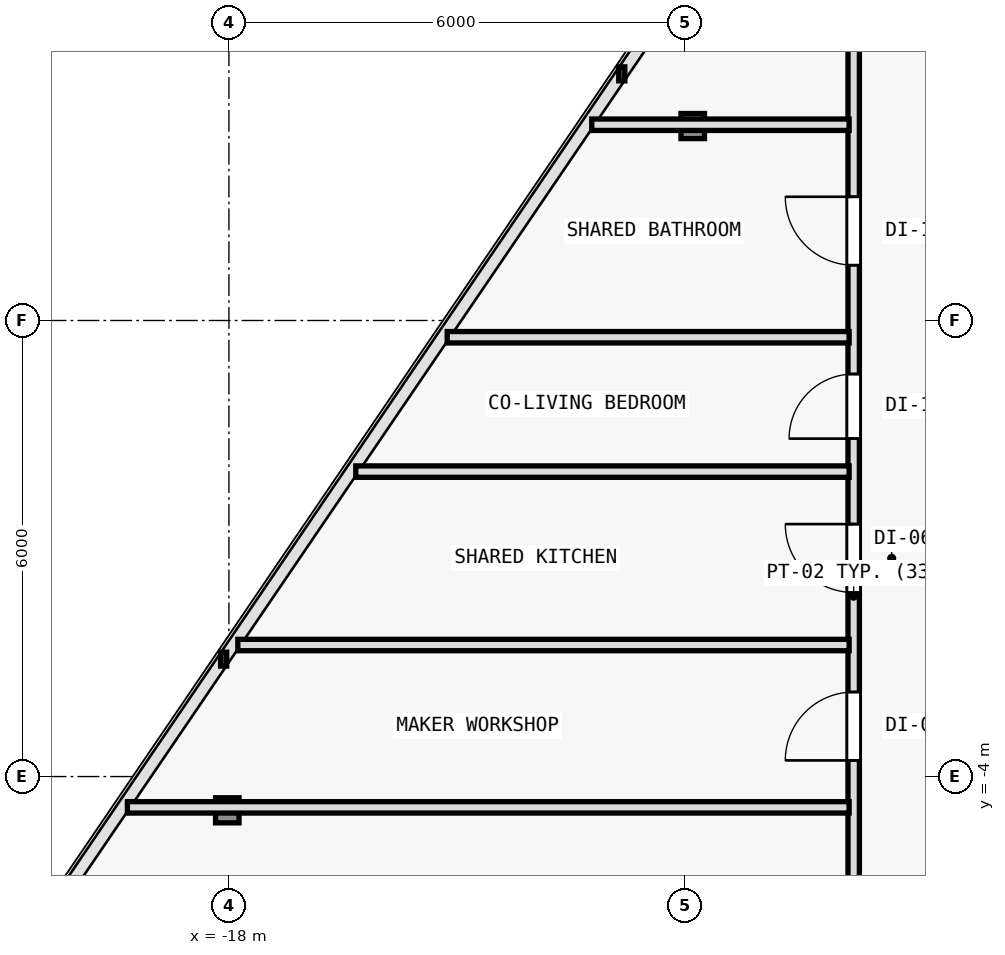
"""IFC4 building model, lengths in metres.
Left out: names, types, materials, properties, quantities, classifications, styles, units other than length and angle.
Written with IfcOpenShell. Run it as: python <this file> out.ifc"""

import sys

from ifc_helpers import new_model, si_unit, direction, frame, frame_2d, origin, origin_2d, place, context, subcontext, project, spatial, rectangle, i_section, extrude, element, fill, save


model = new_model("IFC4")
c1 = context("Model", 3, precision=1e-05, world=origin(), true_north=direction((0.0, 1.0)))
c2 = subcontext(c1, "Body", "Model", "MODEL_VIEW")
j1 = project(units=[si_unit("LENGTHUNIT", "METRE"), si_unit("PLANEANGLEUNIT", "RADIAN")], contexts=[c1])
p1 = place(None, origin())
s1 = spatial("IfcSite", under=j1, at=p1, CompositionType="ELEMENT")
p2 = place(p1, origin())
s2 = spatial("IfcBuilding", under=s1, at=p2, CompositionType="ELEMENT")
p3 = place(p2, frame((0.0, 0.0, 286.8)))
s3 = spatial("IfcBuildingStorey", under=s2, at=p3, CompositionType="ELEMENT", Elevation=286.8)
p4 = place(p3, frame((-11.897, 4.558, 0.005), z_axis=(0.01700241672, 0.009521353363, 0.999810112799), x_axis=(-0.488603368932, 0.87250601595, 0.0)))
e1 = element("IfcColumn", 1, at=p4, inside=s3, PredefinedType="COLUMN", context=c2, shape_type="SweptSolid", body=[
    extrude(i_section(OverallWidth=0.309, OverallDepth=0.33, WebThickness=0.011, FlangeThickness=0.019, FilletRadius=0.027, at=origin_2d()), origin(), (0.0, 0.0, 1.0), 3.59),
])
p5 = place(p3, frame((-18.021, -4.444, 0.005), z_axis=(0.025222449659, 0.021619242565, 0.999448065876), x_axis=(-0.650791373456, 0.759256602365, 0.0)))
e2 = element("IfcColumn", 2, at=p5, inside=s3, PredefinedType="COLUMN", context=c2, shape_type="SweptSolid", body=[
    extrude(i_section(OverallWidth=0.309, OverallDepth=0.33, WebThickness=0.011, FlangeThickness=0.019, FilletRadius=0.027, at=origin_2d()), origin(), (0.0, 0.0, 1.0), 3.591),
])
p6 = place(p3, frame((-9.78, -11.48, 0.0), z_axis=(0.0, 0.0, 1.0), x_axis=(0.0, 1.0, 0.0)))
e3 = element("IfcWall", 3, at=p6, inside=s3, PredefinedType="PARTITIONING", context=c2, shape_type="SweptSolid", body=[
    extrude(rectangle(XDim=19.706, YDim=0.15, at=frame_2d((9.853, 0.0))), origin(), (0.0, 0.0, 1.0), 2.875),
])
p7 = place(p6, frame((9.901, 0.0, 0.0)))
e4 = element("IfcOpeningElement", 4, at=p7, cuts=e3, PredefinedType="OPENING", context=c2, shape_type="SweptSolid", body=[
    extrude(rectangle(XDim=0.9, YDim=2.1, at=frame_2d((0.45, 1.05))), frame((0.0, 0.085, 0.0), z_axis=(0.0, -1.0, 0.0), x_axis=(1.0, 0.0, 0.0)), (0.0, 0.0, 1.0), 0.17),
])
p8 = place(p6, frame((7.692, 0.0, 0.0)))
e5 = element("IfcOpeningElement", 5, at=p8, cuts=e3, PredefinedType="OPENING", context=c2, shape_type="SweptSolid", body=[
    extrude(rectangle(XDim=0.9, YDim=2.1, at=frame_2d((0.45, 1.05))), frame((0.0, 0.085, 0.0), z_axis=(0.0, -1.0, 0.0), x_axis=(1.0, 0.0, 0.0)), (0.0, 0.0, 1.0), 0.17),
])
p9 = place(p6, frame((14.208, 0.0, 0.0)))
e6 = element("IfcOpeningElement", 6, at=p9, cuts=e3, PredefinedType="OPENING", context=c2, shape_type="SweptSolid", body=[
    extrude(rectangle(XDim=0.9, YDim=2.1, at=frame_2d((0.45, 1.05))), frame((0.0, 0.085, 0.0), z_axis=(0.0, -1.0, 0.0), x_axis=(1.0, 0.0, 0.0)), (0.0, 0.0, 1.0), 0.17),
])
p10 = place(p6, frame((11.926, 0.0, 0.0)))
e7 = element("IfcOpeningElement", 7, at=p10, cuts=e3, PredefinedType="OPENING", context=c2, shape_type="SweptSolid", body=[
    extrude(rectangle(XDim=0.85, YDim=2.1, at=frame_2d((0.425, 1.05))), frame((0.0, 0.085, 0.0), z_axis=(0.0, -1.0, 0.0), x_axis=(1.0, 0.0, 0.0)), (0.0, 0.0, 1.0), 0.17),
])
p11 = place(p3, frame((-9.84, 4.575, 0.0), z_axis=(0.0, 0.0, 1.0), x_axis=(-1.0, 0.0, 0.0)))
e8 = element("IfcWall", 8, at=p11, inside=s3, PredefinedType="PARTITIONING", context=c2, shape_type="SweptSolid", body=[
    extrude(rectangle(XDim=3.386, YDim=0.15, at=frame_2d((1.693, 0.0))), origin(), (0.0, 0.0, 1.0), 3.015),
])
p12 = place(p3, frame((-9.84, -4.405, 0.0), z_axis=(0.0, 0.0, 1.0), x_axis=(-1.0, 0.0, 0.0)))
e9 = element("IfcWall", 9, at=p12, inside=s3, PredefinedType="PARTITIONING", context=c2, shape_type="SweptSolid", body=[
    extrude(rectangle(XDim=9.496, YDim=0.15, at=frame_2d((4.748, 0.0))), origin(), (0.0, 0.0, 1.0), 2.875),
])
p13 = place(p3, frame((-9.84, 0.012, 0.0), z_axis=(0.0, 0.0, 1.0), x_axis=(-1.0, 0.0, 0.0)))
e10 = element("IfcWall", 10, at=p13, inside=s3, PredefinedType="PARTITIONING", context=c2, shape_type="SweptSolid", body=[
    extrude(rectangle(XDim=6.491, YDim=0.15, at=frame_2d((3.245, 0.0))), origin(), (0.0, 0.0, 1.0), 2.965),
])
p14 = place(p3, frame((-9.84, -2.27, 0.0), z_axis=(0.0, 0.0, 1.0), x_axis=(-1.0, 0.0, 0.0)))
e11 = element("IfcWall", 11, at=p14, inside=s3, PredefinedType="PARTITIONING", context=c2, shape_type="SweptSolid", body=[
    extrude(rectangle(XDim=8.043, YDim=0.15, at=frame_2d((4.021, 0.0))), origin(), (0.0, 0.0, 1.0), 2.965),
])
p15 = place(p3, frame((-9.84, 1.78, 0.0), z_axis=(0.0, 0.0, 1.0), x_axis=(-1.0, 0.0, 0.0)))
e12 = element("IfcWall", 12, at=p15, inside=s3, PredefinedType="PARTITIONING", context=c2, shape_type="SweptSolid", body=[
    extrude(rectangle(XDim=5.288, YDim=0.15, at=frame_2d((2.644, 0.0))), origin(), (0.0, 0.0, 1.0), 2.965),
])
p16 = place(p7, origin())
e13 = element("IfcDoor", 13, at=p16, inside=s3, OperationType="SINGLE_SWING_RIGHT", PredefinedType="DOOR", context=c2, shape_type="SweptSolid", body=[
    extrude(rectangle(XDim=0.9, YDim=2.1, at=frame_2d((0.45, 1.05))), frame((0.0, 0.025, 0.0), z_axis=(0.0, -1.0, 0.0), x_axis=(1.0, 0.0, 0.0)), (0.0, 0.0, 1.0), 0.05),
])
fill(e4, e13)
p17 = place(p8, origin())
e14 = element("IfcDoor", 14, at=p17, inside=s3, OperationType="SINGLE_SWING_LEFT", PredefinedType="DOOR", context=c2, shape_type="SweptSolid", body=[
    extrude(rectangle(XDim=0.9, YDim=2.1, at=frame_2d((0.45, 1.05))), frame((0.0, 0.025, 0.0), z_axis=(0.0, -1.0, 0.0), x_axis=(1.0, 0.0, 0.0)), (0.0, 0.0, 1.0), 0.05),
])
fill(e5, e14)
p18 = place(p9, origin())
e15 = element("IfcDoor", 15, at=p18, inside=s3, OperationType="SINGLE_SWING_RIGHT", PredefinedType="DOOR", context=c2, shape_type="SweptSolid", body=[
    extrude(rectangle(XDim=0.9, YDim=2.1, at=frame_2d((0.45, 1.05))), frame((0.0, 0.025, 0.0), z_axis=(0.0, -1.0, 0.0), x_axis=(1.0, 0.0, 0.0)), (0.0, 0.0, 1.0), 0.05),
])
fill(e6, e15)
p19 = place(p10, origin())
e16 = element("IfcDoor", 16, at=p19, inside=s3, OperationType="SINGLE_SWING_LEFT", PredefinedType="DOOR", context=c2, shape_type="SweptSolid", body=[
    extrude(rectangle(XDim=0.85, YDim=2.1, at=frame_2d((0.425, 1.05))), frame((0.0, 0.025, 0.0), z_axis=(0.0, -1.0, 0.0), x_axis=(1.0, 0.0, 0.0)), (0.0, 0.0, 1.0), 0.05),
])
fill(e7, e16)
save(model, sys.argv[1])
